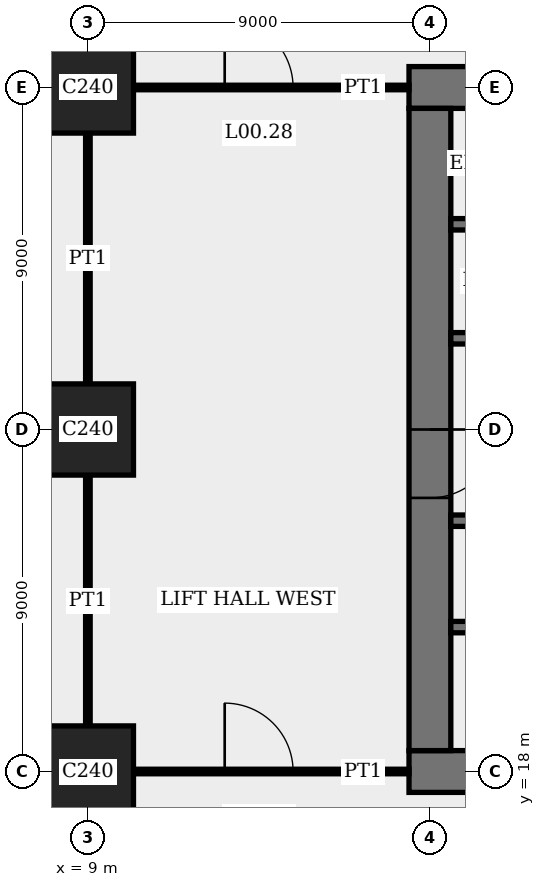
"""IFC4 building model, lengths in metres.
Left out: names, types, materials, properties, quantities, classifications, styles, units other than length and angle.
Written with IfcOpenShell. Run it as: python <this file> out.ifc"""

import sys

from ifc_helpers import new_model, si_unit, direction, frame, frame_2d, origin, origin_2d, place, context, subcontext, project, spatial, rectangle, extrude, element, fill, save


model = new_model("IFC4")
c1 = context("Model", 3, precision=1e-05, world=origin(), true_north=direction((0.0, 1.0)))
c2 = subcontext(c1, "Body", "Model", "MODEL_VIEW")
j1 = project(units=[si_unit("LENGTHUNIT", "METRE"), si_unit("PLANEANGLEUNIT", "RADIAN")], contexts=[c1])
p1 = place(None, origin())
s1 = spatial("IfcSite", under=j1, at=p1, CompositionType="ELEMENT")
p2 = place(p1, origin())
s2 = spatial("IfcBuilding", under=s1, at=p2, CompositionType="ELEMENT")
p3 = place(p2, origin())
s3 = spatial("IfcBuildingStorey", under=s2, at=p3, CompositionType="ELEMENT", Elevation=0.0)
for number, where, z_axis, x_axis in (
    (1, (9.0, 18.0, 0.0), (0.0, 0.0, 1.0), (1.0, 0.0, 0.0)),
    (2, (9.0, 27.0, 0.0), (0.0, 0.0, 1.0), (1.0, 0.0, 0.0)),
    (3, (9.0, 36.0, 0.0), (0.0, 0.0, 1.0), (1.0, 0.0, 0.0)),
):
    element("IfcColumn", number, at=place(p3, frame(where, z_axis=z_axis, x_axis=x_axis)), inside=s3, PredefinedType="COLUMN", context=c2, shape_type="SweptSolid", body=[
        extrude(rectangle(XDim=2.4, YDim=2.4, at=origin_2d()), origin(), (0.0, 0.0, 1.0), 5.4),
    ])
p4 = place(p3, frame((17.45, 18.0, 0.0), z_axis=(0.0, 0.0, 1.0), x_axis=(1.0, 0.0, 0.0)))
e4 = element("IfcWall", 4, at=p4, inside=s3, PredefinedType="SHEAR", context=c2, shape_type="SweptSolid", body=[
    extrude(rectangle(XDim=28.1, YDim=1.1, at=frame_2d((14.05, 0.0))), origin(), (0.0, 0.0, 1.0), 5.4),
])
p5 = place(p4, frame((11.55, 0.0, 0.0)))
e5 = element("IfcOpeningElement", 5, at=p5, cuts=e4, PredefinedType="OPENING", context=c2, shape_type="SweptSolid", body=[
    extrude(rectangle(XDim=1.0, YDim=2.4, at=frame_2d((0.5, 1.2))), frame((0.0, 0.56, 0.0), z_axis=(0.0, -1.0, 0.0), x_axis=(1.0, 0.0, 0.0)), (0.0, 0.0, 1.0), 1.12),
])
p6 = place(p4, frame((16.55, 0.0, 0.0)))
e6 = element("IfcOpeningElement", 6, at=p6, cuts=e4, PredefinedType="OPENING", context=c2, shape_type="SweptSolid", body=[
    extrude(rectangle(XDim=1.0, YDim=2.4, at=frame_2d((0.5, 1.2))), frame((0.0, 0.56, 0.0), z_axis=(0.0, -1.0, 0.0), x_axis=(1.0, 0.0, 0.0)), (0.0, 0.0, 1.0), 1.12),
])
p7 = place(p4, frame((20.0, 0.0, 0.0)))
e7 = element("IfcOpeningElement", 7, at=p7, cuts=e4, PredefinedType="OPENING", context=c2, shape_type="SweptSolid", body=[
    extrude(rectangle(XDim=1.1, YDim=2.4, at=frame_2d((0.55, 1.2))), frame((0.0, 0.56, 0.0), z_axis=(0.0, -1.0, 0.0), x_axis=(1.0, 0.0, 0.0)), (0.0, 0.0, 1.0), 1.12),
])
p8 = place(p4, frame((24.05, 0.0, 0.0)))
e8 = element("IfcOpeningElement", 8, at=p8, cuts=e4, PredefinedType="OPENING", context=c2, shape_type="SweptSolid", body=[
    extrude(rectangle(XDim=1.0, YDim=2.4, at=frame_2d((0.5, 1.2))), frame((0.0, 0.56, 0.0), z_axis=(0.0, -1.0, 0.0), x_axis=(1.0, 0.0, 0.0)), (0.0, 0.0, 1.0), 1.12),
])
p9 = place(p3, frame((45.55, 36.0, 0.0), z_axis=(0.0, 0.0, 1.0), x_axis=(-1.0, 0.0, 0.0)))
e9 = element("IfcWall", 9, at=p9, inside=s3, PredefinedType="SHEAR", context=c2, shape_type="SweptSolid", body=[
    extrude(rectangle(XDim=28.1, YDim=1.1, at=frame_2d((14.05, 0.0))), origin(), (0.0, 0.0, 1.0), 5.4),
])
p10 = place(p9, frame((11.55, 0.0, 0.0)))
e10 = element("IfcOpeningElement", 10, at=p10, cuts=e9, PredefinedType="OPENING", context=c2, shape_type="SweptSolid", body=[
    extrude(rectangle(XDim=1.0, YDim=2.4, at=frame_2d((0.5, 1.2))), frame((0.0, 0.56, 0.0), z_axis=(0.0, -1.0, 0.0), x_axis=(1.0, 0.0, 0.0)), (0.0, 0.0, 1.0), 1.12),
])
p11 = place(p9, frame((16.55, 0.0, 0.0)))
e11 = element("IfcOpeningElement", 11, at=p11, cuts=e9, PredefinedType="OPENING", context=c2, shape_type="SweptSolid", body=[
    extrude(rectangle(XDim=1.0, YDim=2.4, at=frame_2d((0.5, 1.2))), frame((0.0, 0.56, 0.0), z_axis=(0.0, -1.0, 0.0), x_axis=(1.0, 0.0, 0.0)), (0.0, 0.0, 1.0), 1.12),
])
p12 = place(p9, frame((20.0, 0.0, 0.0)))
e12 = element("IfcOpeningElement", 12, at=p12, cuts=e9, PredefinedType="OPENING", context=c2, shape_type="SweptSolid", body=[
    extrude(rectangle(XDim=1.1, YDim=2.4, at=frame_2d((0.55, 1.2))), frame((0.0, 0.56, 0.0), z_axis=(0.0, -1.0, 0.0), x_axis=(1.0, 0.0, 0.0)), (0.0, 0.0, 1.0), 1.12),
])
p13 = place(p9, frame((24.05, 0.0, 0.0)))
e13 = element("IfcOpeningElement", 13, at=p13, cuts=e9, PredefinedType="OPENING", context=c2, shape_type="SweptSolid", body=[
    extrude(rectangle(XDim=1.0, YDim=2.4, at=frame_2d((0.5, 1.2))), frame((0.0, 0.56, 0.0), z_axis=(0.0, -1.0, 0.0), x_axis=(1.0, 0.0, 0.0)), (0.0, 0.0, 1.0), 1.12),
])
p14 = place(p3, frame((18.0, 35.45, 0.0), z_axis=(0.0, 0.0, 1.0), x_axis=(0.0, -1.0, 0.0)))
e14 = element("IfcWall", 14, at=p14, inside=s3, PredefinedType="SHEAR", context=c2, shape_type="SweptSolid", body=[
    extrude(rectangle(XDim=16.9, YDim=1.1, at=frame_2d((8.45, 0.0))), origin(), (0.0, 0.0, 1.0), 5.4),
])
p15 = place(p14, frame((8.45, 0.0, 0.0)))
e15 = element("IfcOpeningElement", 15, at=p15, cuts=e14, PredefinedType="OPENING", context=c2, shape_type="SweptSolid", body=[
    extrude(rectangle(XDim=1.8, YDim=2.4, at=frame_2d((0.9, 1.2))), frame((0.0, 0.56, 0.0), z_axis=(0.0, -1.0, 0.0), x_axis=(1.0, 0.0, 0.0)), (0.0, 0.0, 1.0), 1.12),
])
p16 = place(p3, frame((18.55, 21.8, 0.0), z_axis=(0.0, 0.0, 1.0), x_axis=(1.0, 0.0, 0.0)))
e16 = element("IfcWall", 16, at=p16, inside=s3, PredefinedType="SHEAR", context=c2, shape_type="SweptSolid", body=[
    extrude(rectangle(XDim=8.3, YDim=0.3, at=frame_2d((4.15, 0.0))), origin(), (0.0, 0.0, 1.0), 5.4),
])
p17 = place(p16, frame((6.85, 0.0, 0.0)))
e17 = element("IfcOpeningElement", 17, at=p17, cuts=e16, PredefinedType="OPENING", context=c2, shape_type="SweptSolid", body=[
    extrude(rectangle(XDim=1.0, YDim=2.4, at=frame_2d((0.5, 1.2))), frame((0.0, 0.16, 0.0), z_axis=(0.0, -1.0, 0.0), x_axis=(1.0, 0.0, 0.0)), (0.0, 0.0, 1.0), 0.32),
])
p18 = place(p3, frame((18.55, 24.6, 0.0), z_axis=(0.0, 0.0, 1.0), x_axis=(1.0, 0.0, 0.0)))
e18 = element("IfcWall", 18, at=p18, inside=s3, PredefinedType="SHEAR", context=c2, shape_type="SweptSolid", body=[
    extrude(rectangle(XDim=25.9, YDim=0.3, at=frame_2d((12.95, 0.0))), origin(), (0.0, 0.0, 1.0), 5.4),
])
p19 = place(p18, frame((4.95, 0.0, 0.0)))
e19 = element("IfcOpeningElement", 19, at=p19, cuts=e18, PredefinedType="OPENING", context=c2, shape_type="SweptSolid", body=[
    extrude(rectangle(XDim=1.0, YDim=2.4, at=frame_2d((0.5, 1.2))), frame((0.0, 0.16, 0.0), z_axis=(0.0, -1.0, 0.0), x_axis=(1.0, 0.0, 0.0)), (0.0, 0.0, 1.0), 0.32),
])
p20 = place(p18, frame((24.5, 0.0, 0.0)))
e20 = element("IfcOpeningElement", 20, at=p20, cuts=e18, PredefinedType="OPENING", context=c2, shape_type="SweptSolid", body=[
    extrude(rectangle(XDim=0.9, YDim=2.1, at=frame_2d((0.45, 1.05))), frame((0.0, 0.16, 0.0), z_axis=(0.0, -1.0, 0.0), x_axis=(1.0, 0.0, 0.0)), (0.0, 0.0, 1.0), 0.32),
])
p21 = place(p18, frame((9.4, 0.0, 0.0)))
e21 = element("IfcOpeningElement", 21, at=p21, cuts=e18, PredefinedType="OPENING", context=c2, shape_type="SweptSolid", body=[
    extrude(rectangle(XDim=1.1, YDim=2.4, at=frame_2d((0.55, 1.2))), frame((0.0, 0.16, 0.0), z_axis=(0.0, -1.0, 0.0), x_axis=(1.0, 0.0, 0.0)), (0.0, 0.0, 1.0), 0.32),
])
p22 = place(p18, frame((12.4, 0.0, 0.0)))
e22 = element("IfcOpeningElement", 22, at=p22, cuts=e18, PredefinedType="OPENING", context=c2, shape_type="SweptSolid", body=[
    extrude(rectangle(XDim=1.1, YDim=2.4, at=frame_2d((0.55, 1.2))), frame((0.0, 0.16, 0.0), z_axis=(0.0, -1.0, 0.0), x_axis=(1.0, 0.0, 0.0)), (0.0, 0.0, 1.0), 0.32),
])
p23 = place(p18, frame((15.4, 0.0, 0.0)))
e23 = element("IfcOpeningElement", 23, at=p23, cuts=e18, PredefinedType="OPENING", context=c2, shape_type="SweptSolid", body=[
    extrude(rectangle(XDim=1.1, YDim=2.4, at=frame_2d((0.55, 1.2))), frame((0.0, 0.16, 0.0), z_axis=(0.0, -1.0, 0.0), x_axis=(1.0, 0.0, 0.0)), (0.0, 0.0, 1.0), 0.32),
])
p24 = place(p18, frame((18.4, 0.0, 0.0)))
e24 = element("IfcOpeningElement", 24, at=p24, cuts=e18, PredefinedType="OPENING", context=c2, shape_type="SweptSolid", body=[
    extrude(rectangle(XDim=1.1, YDim=2.4, at=frame_2d((0.55, 1.2))), frame((0.0, 0.16, 0.0), z_axis=(0.0, -1.0, 0.0), x_axis=(1.0, 0.0, 0.0)), (0.0, 0.0, 1.0), 0.32),
])
p25 = place(p18, frame((21.3, 0.0, 0.0)))
e25 = element("IfcOpeningElement", 25, at=p25, cuts=e18, PredefinedType="OPENING", context=c2, shape_type="SweptSolid", body=[
    extrude(rectangle(XDim=1.3, YDim=2.4, at=frame_2d((0.65, 1.2))), frame((0.0, 0.16, 0.0), z_axis=(0.0, -1.0, 0.0), x_axis=(1.0, 0.0, 0.0)), (0.0, 0.0, 1.0), 0.32),
])
p26 = place(p3, frame((18.55, 29.4, 0.0), z_axis=(0.0, 0.0, 1.0), x_axis=(1.0, 0.0, 0.0)))
e26 = element("IfcWall", 26, at=p26, inside=s3, PredefinedType="SHEAR", context=c2, shape_type="SweptSolid", body=[
    extrude(rectangle(XDim=25.9, YDim=0.3, at=frame_2d((12.95, 0.0))), origin(), (0.0, 0.0, 1.0), 5.4),
])
p27 = place(p26, frame((19.95, 0.0, 0.0)))
e27 = element("IfcOpeningElement", 27, at=p27, cuts=e26, PredefinedType="OPENING", context=c2, shape_type="SweptSolid", body=[
    extrude(rectangle(XDim=1.0, YDim=2.4, at=frame_2d((0.5, 1.2))), frame((0.0, 0.16, 0.0), z_axis=(0.0, -1.0, 0.0), x_axis=(1.0, 0.0, 0.0)), (0.0, 0.0, 1.0), 0.32),
])
p28 = place(p26, frame((0.5, 0.0, 0.0)))
e28 = element("IfcOpeningElement", 28, at=p28, cuts=e26, PredefinedType="OPENING", context=c2, shape_type="SweptSolid", body=[
    extrude(rectangle(XDim=0.9, YDim=2.1, at=frame_2d((0.45, 1.05))), frame((0.0, 0.16, 0.0), z_axis=(0.0, -1.0, 0.0), x_axis=(1.0, 0.0, 0.0)), (0.0, 0.0, 1.0), 0.32),
])
p29 = place(p26, frame((15.4, 0.0, 0.0)))
e29 = element("IfcOpeningElement", 29, at=p29, cuts=e26, PredefinedType="OPENING", context=c2, shape_type="SweptSolid", body=[
    extrude(rectangle(XDim=1.1, YDim=2.4, at=frame_2d((0.55, 1.2))), frame((0.0, 0.16, 0.0), z_axis=(0.0, -1.0, 0.0), x_axis=(1.0, 0.0, 0.0)), (0.0, 0.0, 1.0), 0.32),
])
p30 = place(p26, frame((12.4, 0.0, 0.0)))
e30 = element("IfcOpeningElement", 30, at=p30, cuts=e26, PredefinedType="OPENING", context=c2, shape_type="SweptSolid", body=[
    extrude(rectangle(XDim=1.1, YDim=2.4, at=frame_2d((0.55, 1.2))), frame((0.0, 0.16, 0.0), z_axis=(0.0, -1.0, 0.0), x_axis=(1.0, 0.0, 0.0)), (0.0, 0.0, 1.0), 0.32),
])
p31 = place(p26, frame((9.4, 0.0, 0.0)))
e31 = element("IfcOpeningElement", 31, at=p31, cuts=e26, PredefinedType="OPENING", context=c2, shape_type="SweptSolid", body=[
    extrude(rectangle(XDim=1.1, YDim=2.4, at=frame_2d((0.55, 1.2))), frame((0.0, 0.16, 0.0), z_axis=(0.0, -1.0, 0.0), x_axis=(1.0, 0.0, 0.0)), (0.0, 0.0, 1.0), 0.32),
])
p32 = place(p26, frame((6.4, 0.0, 0.0)))
e32 = element("IfcOpeningElement", 32, at=p32, cuts=e26, PredefinedType="OPENING", context=c2, shape_type="SweptSolid", body=[
    extrude(rectangle(XDim=1.1, YDim=2.4, at=frame_2d((0.55, 1.2))), frame((0.0, 0.16, 0.0), z_axis=(0.0, -1.0, 0.0), x_axis=(1.0, 0.0, 0.0)), (0.0, 0.0, 1.0), 0.32),
])
p33 = place(p26, frame((3.3, 0.0, 0.0)))
e33 = element("IfcOpeningElement", 33, at=p33, cuts=e26, PredefinedType="OPENING", context=c2, shape_type="SweptSolid", body=[
    extrude(rectangle(XDim=1.3, YDim=2.4, at=frame_2d((0.65, 1.2))), frame((0.0, 0.16, 0.0), z_axis=(0.0, -1.0, 0.0), x_axis=(1.0, 0.0, 0.0)), (0.0, 0.0, 1.0), 0.32),
])
p34 = place(p3, frame((18.55, 32.4, 0.0), z_axis=(0.0, 0.0, 1.0), x_axis=(1.0, 0.0, 0.0)))
e34 = element("IfcWall", 34, at=p34, inside=s3, PredefinedType="SHEAR", context=c2, shape_type="SweptSolid", body=[
    extrude(rectangle(XDim=17.3, YDim=0.3, at=frame_2d((8.65, 0.0))), origin(), (0.0, 0.0, 1.0), 5.4),
])
p35 = place(p3, frame((10.2, 18.0, 0.0), z_axis=(0.0, 0.0, 1.0), x_axis=(1.0, 0.0, 0.0)))
e35 = element("IfcWall", 35, at=p35, inside=s3, PredefinedType="PARTITIONING", context=c2, shape_type="SweptSolid", body=[
    extrude(rectangle(XDim=7.25, YDim=0.12, at=frame_2d((3.625, 0.0))), origin(), (0.0, 0.0, 1.0), 4.3),
])
p36 = place(p35, frame((2.4, 0.0, 0.0)))
e36 = element("IfcOpeningElement", 36, at=p36, cuts=e35, PredefinedType="OPENING", context=c2, shape_type="SweptSolid", body=[
    extrude(rectangle(XDim=1.8, YDim=2.7, at=frame_2d((0.9, 1.35))), frame((0.0, 0.07, 0.0), z_axis=(0.0, -1.0, 0.0), x_axis=(1.0, 0.0, 0.0)), (0.0, 0.0, 1.0), 0.14),
])
p37 = place(p3, frame((10.2, 36.0, 0.0), z_axis=(0.0, 0.0, 1.0), x_axis=(1.0, 0.0, 0.0)))
e37 = element("IfcWall", 37, at=p37, inside=s3, PredefinedType="PARTITIONING", context=c2, shape_type="SweptSolid", body=[
    extrude(rectangle(XDim=7.25, YDim=0.12, at=frame_2d((3.625, 0.0))), origin(), (0.0, 0.0, 1.0), 4.3),
])
p38 = place(p37, frame((2.4, 0.0, 0.0)))
e38 = element("IfcOpeningElement", 38, at=p38, cuts=e37, PredefinedType="OPENING", context=c2, shape_type="SweptSolid", body=[
    extrude(rectangle(XDim=1.8, YDim=2.7, at=frame_2d((0.9, 1.35))), frame((0.0, 0.07, 0.0), z_axis=(0.0, -1.0, 0.0), x_axis=(1.0, 0.0, 0.0)), (0.0, 0.0, 1.0), 0.14),
])
for number, where, z_axis, x_axis in (
    (39, (9.0, 19.2, 0.0), (0.0, 0.0, 1.0), (0.0, 1.0, 0.0)),
    (40, (9.0, 28.2, 0.0), (0.0, 0.0, 1.0), (0.0, 1.0, 0.0)),
):
    element("IfcWall", number, at=place(p3, frame(where, z_axis=z_axis, x_axis=x_axis)), inside=s3, PredefinedType="PARTITIONING", context=c2, shape_type="SweptSolid", body=[
        extrude(rectangle(XDim=6.6, YDim=0.12, at=frame_2d((3.3, 0.0))), origin(), (0.0, 0.0, 1.0), 4.3),
    ])
p39 = place(p15, origin())
e41 = element("IfcDoor", 41, at=p39, inside=s3, OperationType="DOUBLE_DOOR_DOUBLE_SWING", PredefinedType="DOOR", context=c2, shape_type="SweptSolid", body=[
    extrude(rectangle(XDim=1.8, YDim=2.4, at=frame_2d((0.9, 1.2))), frame((0.0, 0.03, 0.0), z_axis=(0.0, -1.0, 0.0), x_axis=(1.0, 0.0, 0.0)), (0.0, 0.0, 1.0), 0.06),
    extrude(rectangle(XDim=0.04, YDim=2.4, at=frame_2d((0.02, 1.2))), frame((0.0, 0.55, 0.0), z_axis=(0.0, -1.0, 0.0), x_axis=(1.0, 0.0, 0.0)), (0.0, 0.0, 1.0), 1.1),
    extrude(rectangle(XDim=0.04, YDim=2.4, at=frame_2d((1.78, 1.2))), frame((0.0, 0.55, 0.0), z_axis=(0.0, -1.0, 0.0), x_axis=(1.0, 0.0, 0.0)), (0.0, 0.0, 1.0), 1.1),
    extrude(rectangle(XDim=1.8, YDim=0.04, at=frame_2d((0.9, 2.38))), frame((0.0, 0.55, 0.0), z_axis=(0.0, -1.0, 0.0), x_axis=(1.0, 0.0, 0.0)), (0.0, 0.0, 1.0), 1.1),
])
fill(e15, e41)
p40 = place(p36, origin())
e42 = element("IfcDoor", 42, at=p40, inside=s3, OperationType="DOUBLE_DOOR_DOUBLE_SWING", PredefinedType="DOOR", context=c2, shape_type="SweptSolid", body=[
    extrude(rectangle(XDim=1.8, YDim=2.7, at=frame_2d((0.9, 1.35))), frame((0.0, 0.025, 0.0), z_axis=(0.0, -1.0, 0.0), x_axis=(1.0, 0.0, 0.0)), (0.0, 0.0, 1.0), 0.05),
])
fill(e36, e42)
p41 = place(p38, origin())
e43 = element("IfcDoor", 43, at=p41, inside=s3, OperationType="DOUBLE_DOOR_DOUBLE_SWING", PredefinedType="DOOR", context=c2, shape_type="SweptSolid", body=[
    extrude(rectangle(XDim=1.8, YDim=2.7, at=frame_2d((0.9, 1.35))), frame((0.0, 0.025, 0.0), z_axis=(0.0, -1.0, 0.0), x_axis=(1.0, 0.0, 0.0)), (0.0, 0.0, 1.0), 0.05),
])
fill(e38, e43)
save(model, sys.argv[1])
